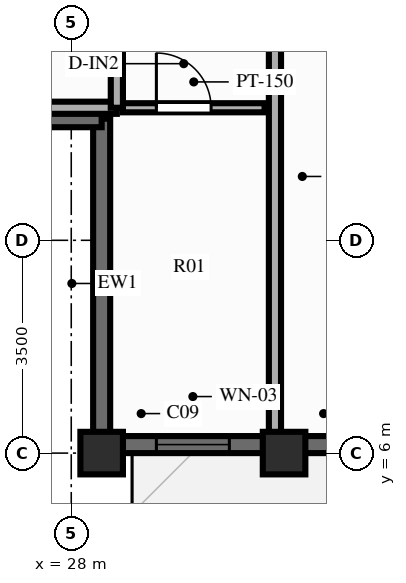
"""IFC4 building model, lengths in metres.
Left out: names, types, materials, properties, quantities, classifications, styles, units other than length and angle.
Written with IfcOpenShell. Run it as: python <this file> out.ifc"""

import sys

from ifc_helpers import new_model, si_unit, direction, frame, frame_2d, origin, origin_2d, place, context, subcontext, project, spatial, rectangle, extrude, source, transform, mapped, element, fill, save


model = new_model("IFC4")
c1 = context("Model", 3, precision=1e-05, world=origin(), true_north=direction((0.0, 1.0)))
c2 = subcontext(c1, "Body", "Model", "MODEL_VIEW")
j1 = project(units=[si_unit("LENGTHUNIT", "METRE"), si_unit("PLANEANGLEUNIT", "RADIAN")], contexts=[c1])
p1 = place(None, origin())
s1 = spatial("IfcSite", under=j1, at=p1, CompositionType="ELEMENT")
p2 = place(p1, origin())
s2 = spatial("IfcBuilding", under=s1, at=p2, CompositionType="ELEMENT")
p3 = place(p2, frame((0.0, 0.0, 240.0)))
s3 = spatial("IfcBuildingStorey", under=s2, at=p3, CompositionType="ELEMENT", Elevation=240.0)
m1 = source(origin(), c2, "Body", "SweptSolid", [
    extrude(rectangle(XDim=0.7, YDim=0.7, at=origin_2d()), origin(), (0.0, 0.0, 1.0), 3.0),
])
for number, where, z_axis, x_axis in (
    (1, (28.5, 6.0, 0.0), (0.0, 0.0, 1.0), (1.0, 0.0, 0.0)),
    (2, (31.5, 6.0, 0.0), (0.0, 0.0, 1.0), (1.0, 0.0, 0.0)),
):
    element("IfcColumn", number, at=place(p3, frame(where, z_axis=z_axis, x_axis=x_axis)), inside=s3, PredefinedType="COLUMN", context=c2, shape_type="MappedRepresentation", body=[
        mapped(m1, transform((0.0, 0.0, 0.0), scale=1.0)),
    ])
p4 = place(p3, frame((28.5, 6.14, 0.0), z_axis=(0.0, 0.0, 1.0), x_axis=(1.0, 0.0, 0.0)))
e3 = element("IfcWall", 3, at=p4, inside=s3, PredefinedType="SOLIDWALL", context=c2, shape_type="SweptSolid", body=[
    extrude(rectangle(XDim=19.0, YDim=0.28, at=frame_2d((9.5, 0.0))), origin(), (0.0, 0.0, 1.0), 2.28),
])
p5 = place(p4, frame((0.9, 0.0, 0.25)))
e4 = element("IfcOpeningElement", 4, at=p5, cuts=e3, PredefinedType="OPENING", context=c2, shape_type="SweptSolid", body=[
    extrude(rectangle(XDim=1.2, YDim=1.5, at=frame_2d((0.6, 0.75))), frame((0.0, 0.152, 0.0), z_axis=(0.0, -1.0, 0.0), x_axis=(1.0, 0.0, 0.0)), (0.0, 0.0, 1.0), 0.304),
])
p6 = place(p4, frame((6.895, 0.0, 0.0), z_axis=(0.0, 0.0, 1.0), x_axis=(-1.0, 0.0, 0.0)))
e5 = element("IfcOpeningElement", 5, at=p6, cuts=e3, PredefinedType="OPENING", context=c2, shape_type="SweptSolid", body=[
    extrude(rectangle(XDim=1.1, YDim=2.15, at=frame_2d((0.55, 1.075))), frame((0.0, 0.152, 0.0), z_axis=(0.0, -1.0, 0.0), x_axis=(1.0, 0.0, 0.0)), (0.0, 0.0, 1.0), 0.304),
])
p7 = place(p4, frame((10.8, 0.0, 0.25)))
e6 = element("IfcOpeningElement", 6, at=p7, cuts=e3, PredefinedType="OPENING", context=c2, shape_type="SweptSolid", body=[
    extrude(rectangle(XDim=1.2, YDim=1.5, at=frame_2d((0.6, 0.75))), frame((0.0, 0.152, 0.0), z_axis=(0.0, -1.0, 0.0), x_axis=(1.0, 0.0, 0.0)), (0.0, 0.0, 1.0), 0.304),
])
p8 = place(p4, frame((13.955, 0.0, 0.25)))
e7 = element("IfcOpeningElement", 7, at=p8, cuts=e3, PredefinedType="OPENING", context=c2, shape_type="SweptSolid", body=[
    extrude(rectangle(XDim=1.2, YDim=1.5, at=frame_2d((0.6, 0.75))), frame((0.0, 0.152, 0.0), z_axis=(0.0, -1.0, 0.0), x_axis=(1.0, 0.0, 0.0)), (0.0, 0.0, 1.0), 0.304),
])
p9 = place(p4, frame((16.9, 0.0, 0.25)))
e8 = element("IfcOpeningElement", 8, at=p9, cuts=e3, PredefinedType="OPENING", context=c2, shape_type="SweptSolid", body=[
    extrude(rectangle(XDim=1.2, YDim=1.5, at=frame_2d((0.6, 0.75))), frame((0.0, 0.152, 0.0), z_axis=(0.0, -1.0, 0.0), x_axis=(1.0, 0.0, 0.0)), (0.0, 0.0, 1.0), 0.304),
])
for number, where, z_axis, x_axis in (
    (9, (28.5, 6.08, 0.0), (0.0, 0.0, 1.0), (0.0, 1.0, 0.0)),
    (10, (23.08, 11.5, 0.0), (0.0, 0.0, 1.0), (1.0, 0.0, 0.0)),
):
    element("IfcWall", number, at=place(p3, frame(where, z_axis=z_axis, x_axis=x_axis)), inside=s3, PredefinedType="SOLIDWALL", context=c2, shape_type="SweptSolid", body=[
        extrude(rectangle(XDim=5.42, YDim=0.28, at=frame_2d((2.71, 0.0))), origin(), (0.0, 0.0, 1.0), 2.28),
    ])
p10 = place(p3, frame((28.85, 11.68, 0.0), z_axis=(0.0, 0.0, 1.0), x_axis=(1.0, 0.0, 0.0)))
e11 = element("IfcWall", 11, at=p10, inside=s3, PredefinedType="PARTITIONING", context=c2, shape_type="SweptSolid", body=[
    extrude(rectangle(XDim=2.33, YDim=0.15, at=frame_2d((1.165, 0.0))), origin(), (0.0, 0.0, 1.0), 2.79),
])
p11 = place(p10, frame((0.55, 0.0, 0.0)))
e12 = element("IfcOpeningElement", 12, at=p11, cuts=e11, PredefinedType="OPENING", context=c2, shape_type="SweptSolid", body=[
    extrude(rectangle(XDim=0.9, YDim=2.1, at=frame_2d((0.45, 1.05))), frame((0.0, 0.087, 0.0), z_axis=(0.0, -1.0, 0.0), x_axis=(1.0, 0.0, 0.0)), (0.0, 0.0, 1.0), 0.174),
])
p12 = place(p3, frame((31.35, 14.95, 0.0), z_axis=(0.0, 0.0, 1.0), x_axis=(0.0, -1.0, 0.0)))
e13 = element("IfcWall", 13, at=p12, inside=s3, PredefinedType="PARTITIONING", context=c2, shape_type="SweptSolid", body=[
    extrude(rectangle(XDim=8.8, YDim=0.2, at=frame_2d((4.4, 0.0))), origin(), (0.0, 0.0, 1.0), 2.39),
])
p13 = place(p3, frame((28.75, 11.68, 0.0), z_axis=(0.0, 0.0, 1.0), x_axis=(-1.0, 0.0, 0.0)))
e14 = element("IfcWall", 14, at=p13, inside=s3, PredefinedType="PARTITIONING", context=c2, shape_type="SweptSolid", body=[
    extrude(rectangle(XDim=5.6, YDim=0.2, at=frame_2d((2.8, 0.0))), origin(), (0.0, 0.0, 1.0), 2.79),
])
p14 = place(p3, frame((28.75, 11.68, 0.0), z_axis=(0.0, 0.0, 1.0), x_axis=(0.0, 1.0, 0.0)))
e15 = element("IfcWall", 15, at=p14, inside=s3, PredefinedType="PARTITIONING", context=c2, shape_type="SweptSolid", body=[
    extrude(rectangle(XDim=3.983, YDim=0.2, at=frame_2d((1.992, 0.0))), origin(), (0.0, 0.0, 1.0), 2.79),
])
m2 = source(origin(), c2, "Body", "SweptSolid", [
    extrude(rectangle(XDim=1.2, YDim=1.5, at=frame_2d((0.6, 0.75))), frame((0.0, 0.03, 0.0), z_axis=(0.0, -1.0, 0.0), x_axis=(1.0, 0.0, 0.0)), (0.0, 0.0, 1.0), 0.06),
])
p15 = place(p5, origin())
e16 = element("IfcWindow", 16, at=p15, inside=s3, PartitioningType="SINGLE_PANEL", PredefinedType="WINDOW", context=c2, shape_type="MappedRepresentation", body=[
    mapped(m2, transform((0.0, 0.0, 0.0), scale=1.0)),
])
fill(e4, e16)
m3 = source(origin(), c2, "Body", "SweptSolid", [
    extrude(rectangle(XDim=0.9, YDim=2.1, at=frame_2d((0.45, 1.05))), frame((0.0, 0.025, 0.0), z_axis=(0.0, -1.0, 0.0), x_axis=(1.0, 0.0, 0.0)), (0.0, 0.0, 1.0), 0.05),
])
p16 = place(p11, origin())
e17 = element("IfcDoor", 17, at=p16, inside=s3, OperationType="SINGLE_SWING_LEFT", PredefinedType="DOOR", context=c2, shape_type="MappedRepresentation", body=[
    mapped(m3, transform((0.0, 0.0, 0.0), scale=1.0)),
])
fill(e12, e17)
save(model, sys.argv[1])
